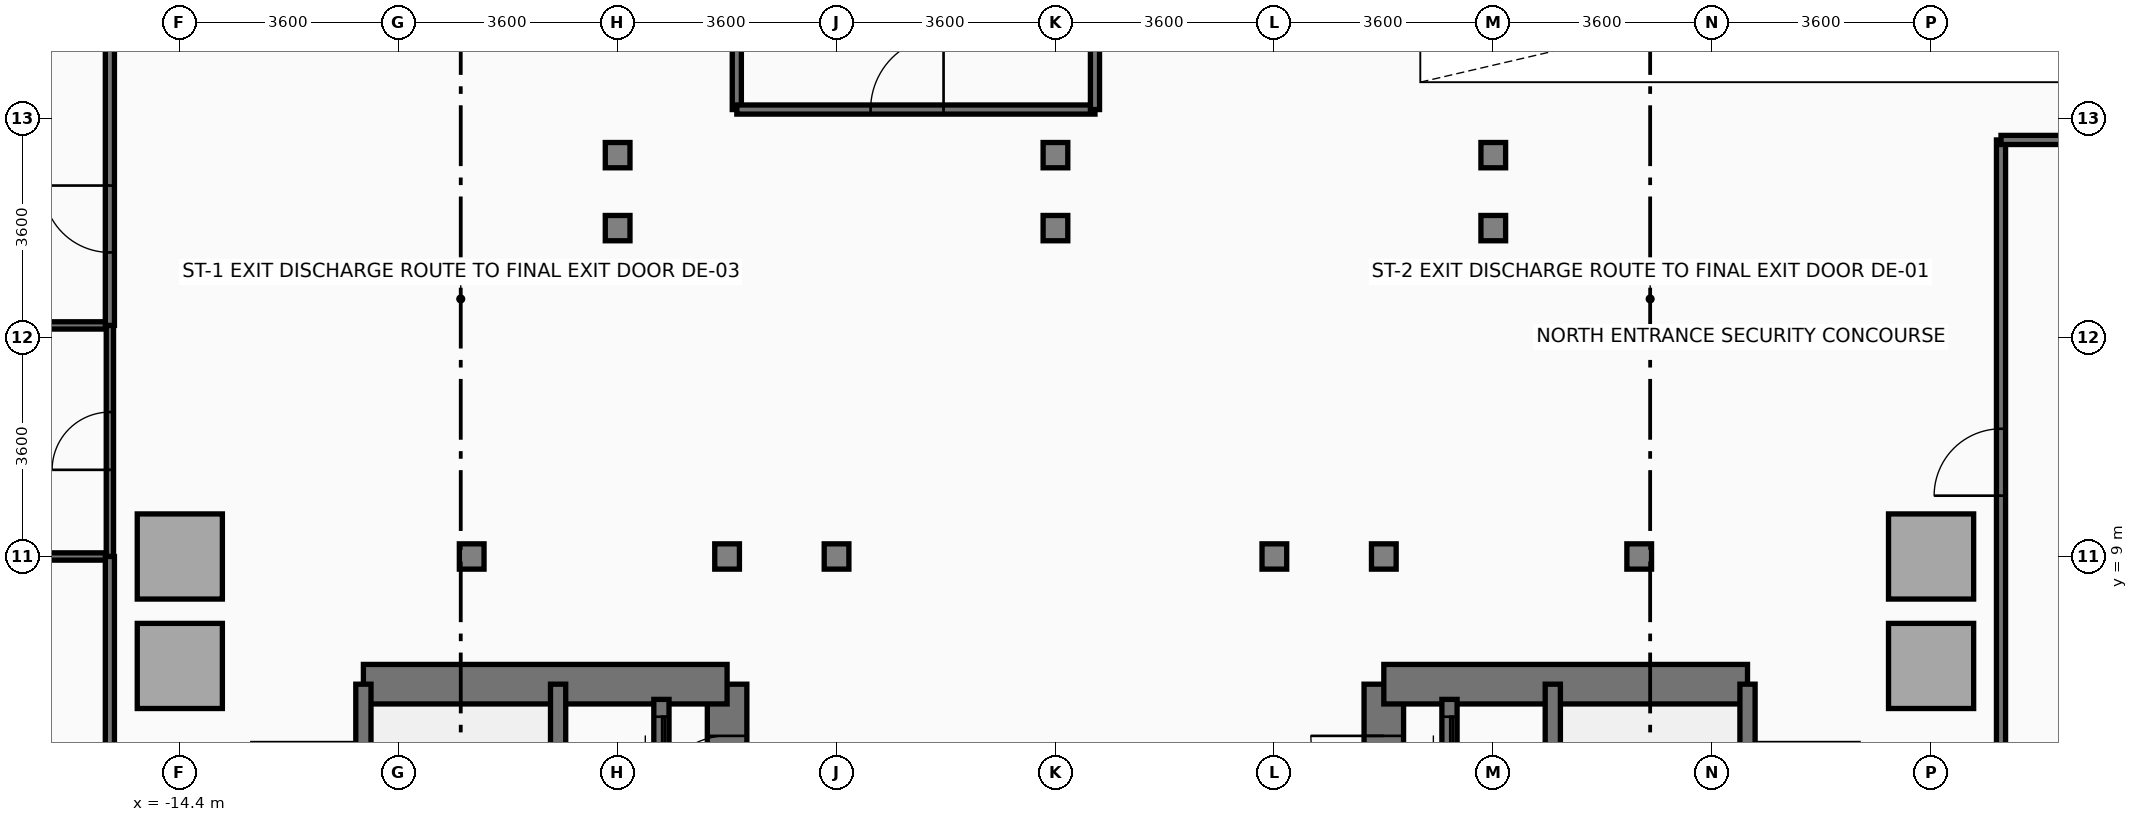
"""IFC4 building model, lengths in metres.
Left out: names, types, materials, properties, quantities, classifications, styles, units other than length and angle.
Written with IfcOpenShell. Run it as: python <this file> out.ifc"""

import sys

from ifc_helpers import new_model, si_unit, direction, frame, frame_2d, origin, origin_2d, place, context, subcontext, project, spatial, rectangle, i_section, extrude, source, transform, mapped, element, fill, save


model = new_model("IFC4")
c1 = context("Model", 3, precision=1e-05, world=origin(), true_north=direction((0.0, 1.0)))
c2 = subcontext(c1, "Body", "Model", "MODEL_VIEW")
j1 = project(units=[si_unit("LENGTHUNIT", "METRE"), si_unit("PLANEANGLEUNIT", "RADIAN")], contexts=[c1])
p1 = place(None, origin())
s1 = spatial("IfcSite", under=j1, at=p1, CompositionType="ELEMENT")
p2 = place(p1, origin())
s2 = spatial("IfcBuilding", under=s1, at=p2, CompositionType="ELEMENT")
p3 = place(p2, origin())
s3 = spatial("IfcBuildingStorey", under=s2, at=p3, CompositionType="ELEMENT", Elevation=0.0)
m1 = source(origin(), c2, "Body", "SweptSolid", [
    extrude(rectangle(XDim=1.4, YDim=1.4, at=origin_2d()), origin(), (0.0, 0.0, 1.0), 5.15),
])
for number, where, z_axis, x_axis in (
    (1, (-14.4, 7.2, 0.0), (0.0, 0.0, 1.0), (1.0, 0.0, 0.0)),
    (2, (-14.4, 9.0, 0.0), (0.0, 0.0, 1.0), (1.0, 0.0, 0.0)),
):
    element("IfcColumn", number, at=place(p3, frame(where, z_axis=z_axis, x_axis=x_axis)), inside=s3, PredefinedType="COLUMN", context=c2, shape_type="MappedRepresentation", body=[
        mapped(m1, transform((0.0, 0.0, 0.0), x_axis=(1.0, 0.0, 0.0), y_axis=(0.0, 1.0, 0.0), z_axis=(0.0, 0.0, 1.0), scale=1.0)),
    ])
m2 = source(origin(), c2, "Body", "SweptSolid", [
    extrude(i_section(OverallWidth=0.406, OverallDepth=0.416, WebThickness=0.024, FlangeThickness=0.039, at=origin_2d()), origin(), (0.0, 0.0, 1.0), 5.15),
])
for number, where, z_axis, x_axis in (
    (3, (-9.6, 9.0, 0.0), (0.0, 0.0, 1.0), (1.0, 0.0, 0.0)),
    (4, (-7.2, 14.4, 0.0), (0.0, 0.0, 1.0), (1.0, 0.0, 0.0)),
    (5, (-7.2, 15.6, 0.0), (0.0, 0.0, 1.0), (1.0, 0.0, 0.0)),
    (6, (-5.4, 9.0, 0.0), (0.0, 0.0, 1.0), (1.0, 0.0, 0.0)),
    (7, (-3.6, 9.0, 0.0), (0.0, 0.0, 1.0), (1.0, 0.0, 0.0)),
    (8, (0.0, 14.4, 0.0), (0.0, 0.0, 1.0), (1.0, 0.0, 0.0)),
    (9, (0.0, 15.6, 0.0), (0.0, 0.0, 1.0), (1.0, 0.0, 0.0)),
    (10, (3.6, 9.0, 0.0), (0.0, 0.0, 1.0), (1.0, 0.0, 0.0)),
    (11, (5.4, 9.0, 0.0), (0.0, 0.0, 1.0), (1.0, 0.0, 0.0)),
    (12, (7.2, 14.4, 0.0), (0.0, 0.0, 1.0), (1.0, 0.0, 0.0)),
    (13, (7.2, 15.6, 0.0), (0.0, 0.0, 1.0), (1.0, 0.0, 0.0)),
    (14, (9.6, 9.0, 0.0), (0.0, 0.0, 1.0), (1.0, 0.0, 0.0)),
):
    element("IfcColumn", number, at=place(p3, frame(where, z_axis=z_axis, x_axis=x_axis)), inside=s3, PredefinedType="COLUMN", context=c2, shape_type="MappedRepresentation", body=[
        mapped(m2, transform((0.0, 0.0, 0.0), x_axis=(1.0, 0.0, 0.0), y_axis=(0.0, 1.0, 0.0), z_axis=(0.0, 0.0, 1.0), scale=1.0)),
    ])
for number, where, z_axis, x_axis in (
    (15, (14.4, 7.2, 0.0), (0.0, 0.0, 1.0), (1.0, 0.0, 0.0)),
    (16, (14.4, 9.0, 0.0), (0.0, 0.0, 1.0), (1.0, 0.0, 0.0)),
):
    element("IfcColumn", number, at=place(p3, frame(where, z_axis=z_axis, x_axis=x_axis)), inside=s3, PredefinedType="COLUMN", context=c2, shape_type="MappedRepresentation", body=[
        mapped(m1, transform((0.0, 0.0, 0.0), x_axis=(1.0, 0.0, 0.0), y_axis=(0.0, 1.0, 0.0), z_axis=(0.0, 0.0, 1.0), scale=1.0)),
    ])
p4 = place(p3, frame((-5.4, -5.6, 0.0), z_axis=(0.0, 0.0, 1.0), x_axis=(0.0, 1.0, 0.0)))
e17 = element("IfcWall", 17, at=p4, inside=s3, PredefinedType="SHEAR", context=c2, shape_type="SweptSolid", body=[
    extrude(rectangle(XDim=12.5, YDim=0.65, at=frame_2d((6.25, 0.0))), origin(), (0.0, 0.0, 1.0), 5.15),
])
p5 = place(p4, frame((4.55, 0.0, 0.0)))
e18 = element("IfcOpeningElement", 18, at=p5, cuts=e17, PredefinedType="OPENING", context=c2, shape_type="SweptSolid", body=[
    extrude(rectangle(XDim=1.2, YDim=2.2, at=frame_2d((0.6, 1.1))), frame((0.0, 0.335, 0.0), z_axis=(0.0, -1.0, 0.0), x_axis=(1.0, 0.0, 0.0)), (0.0, 0.0, 1.0), 0.67),
])
p6 = place(p4, frame((10.45, 0.0, 0.0)))
e19 = element("IfcOpeningElement", 19, at=p6, cuts=e17, PredefinedType="OPENING", context=c2, shape_type="SweptSolid", body=[
    extrude(rectangle(XDim=1.2, YDim=2.2, at=frame_2d((0.6, 1.1))), frame((0.0, 0.335, 0.0), z_axis=(0.0, -1.0, 0.0), x_axis=(1.0, 0.0, 0.0)), (0.0, 0.0, 1.0), 0.67),
])
p7 = place(p4, frame((6.86, 0.0, 0.0)))
e20 = element("IfcOpeningElement", 20, at=p7, cuts=e17, PredefinedType="OPENING", context=c2, shape_type="SweptSolid", body=[
    extrude(rectangle(XDim=0.8, YDim=2.1, at=frame_2d((0.4, 1.05))), frame((0.0, 0.335, 0.0), z_axis=(0.0, -1.0, 0.0), x_axis=(1.0, 0.0, 0.0)), (0.0, 0.0, 1.0), 0.67),
])
p8 = place(p3, frame((-11.381, 6.9, 0.0), z_axis=(0.0, 0.0, 1.0), x_axis=(1.0, 0.0, 0.0)))
e21 = element("IfcWall", 21, at=p8, inside=s3, PredefinedType="SHEAR", context=c2, shape_type="SweptSolid", body=[
    extrude(rectangle(XDim=5.981, YDim=0.65, at=frame_2d((2.991, 0.0))), origin(), (0.0, 0.0, 1.0), 5.15),
])
p9 = place(p3, frame((-8.179, -0.041, 0.0), z_axis=(0.0, 0.0, 1.0), x_axis=(0.0, 1.0, 0.0)))
e22 = element("IfcWall", 22, at=p9, inside=s3, PredefinedType="SOLIDWALL", context=c2, shape_type="SweptSolid", body=[
    extrude(rectangle(XDim=6.941, YDim=0.25, at=frame_2d((3.47, 0.0))), origin(), (0.0, 0.0, 1.0), 5.15),
])
p10 = place(p9, frame((0.2, 0.0, 0.0)))
e23 = element("IfcOpeningElement", 23, at=p10, cuts=e22, PredefinedType="OPENING", context=c2, shape_type="SweptSolid", body=[
    extrude(rectangle(XDim=1.2, YDim=2.2, at=frame_2d((0.6, 1.1))), frame((0.0, 0.135, 0.0), z_axis=(0.0, -1.0, 0.0), x_axis=(1.0, 0.0, 0.0)), (0.0, 0.0, 1.0), 0.27),
])
p11 = place(p3, frame((-11.381, -0.041, 0.0), z_axis=(0.0, 0.0, 1.0), x_axis=(0.0, 1.0, 0.0)))
e24 = element("IfcWall", 24, at=p11, inside=s3, PredefinedType="SOLIDWALL", context=c2, shape_type="SweptSolid", body=[
    extrude(rectangle(XDim=6.941, YDim=0.25, at=frame_2d((3.47, 0.0))), origin(), (0.0, 0.0, 1.0), 5.15),
])
p12 = place(p3, frame((5.4, -5.6, 0.0), z_axis=(0.0, 0.0, 1.0), x_axis=(0.0, 1.0, 0.0)))
e25 = element("IfcWall", 25, at=p12, inside=s3, PredefinedType="SHEAR", context=c2, shape_type="SweptSolid", body=[
    extrude(rectangle(XDim=12.5, YDim=0.65, at=frame_2d((6.25, 0.0))), origin(), (0.0, 0.0, 1.0), 5.15),
])
p13 = place(p12, frame((4.55, 0.0, 0.0)))
e26 = element("IfcOpeningElement", 26, at=p13, cuts=e25, PredefinedType="OPENING", context=c2, shape_type="SweptSolid", body=[
    extrude(rectangle(XDim=1.2, YDim=2.2, at=frame_2d((0.6, 1.1))), frame((0.0, 0.335, 0.0), z_axis=(0.0, -1.0, 0.0), x_axis=(1.0, 0.0, 0.0)), (0.0, 0.0, 1.0), 0.67),
])
p14 = place(p12, frame((10.45, 0.0, 0.0)))
e27 = element("IfcOpeningElement", 27, at=p14, cuts=e25, PredefinedType="OPENING", context=c2, shape_type="SweptSolid", body=[
    extrude(rectangle(XDim=1.2, YDim=2.2, at=frame_2d((0.6, 1.1))), frame((0.0, 0.335, 0.0), z_axis=(0.0, -1.0, 0.0), x_axis=(1.0, 0.0, 0.0)), (0.0, 0.0, 1.0), 0.67),
])
p15 = place(p12, frame((6.86, 0.0, 0.0)))
e28 = element("IfcOpeningElement", 28, at=p15, cuts=e25, PredefinedType="OPENING", context=c2, shape_type="SweptSolid", body=[
    extrude(rectangle(XDim=0.8, YDim=2.1, at=frame_2d((0.4, 1.05))), frame((0.0, 0.335, 0.0), z_axis=(0.0, -1.0, 0.0), x_axis=(1.0, 0.0, 0.0)), (0.0, 0.0, 1.0), 0.67),
])
p16 = place(p12, frame((7.88, 0.0, 0.0)))
e29 = element("IfcOpeningElement", 29, at=p16, cuts=e25, PredefinedType="OPENING", context=c2, shape_type="SweptSolid", body=[
    extrude(rectangle(XDim=0.8, YDim=2.1, at=frame_2d((0.4, 1.05))), frame((0.0, 0.335, 0.0), z_axis=(0.0, -1.0, 0.0), x_axis=(1.0, 0.0, 0.0)), (0.0, 0.0, 1.0), 0.67),
])
p17 = place(p3, frame((5.4, 6.9, 0.0), z_axis=(0.0, 0.0, 1.0), x_axis=(1.0, 0.0, 0.0)))
e30 = element("IfcWall", 30, at=p17, inside=s3, PredefinedType="SHEAR", context=c2, shape_type="SweptSolid", body=[
    extrude(rectangle(XDim=5.981, YDim=0.65, at=frame_2d((2.991, 0.0))), origin(), (0.0, 0.0, 1.0), 5.15),
])
p18 = place(p3, frame((8.179, -0.041, 0.0), z_axis=(0.0, 0.0, 1.0), x_axis=(0.0, 1.0, 0.0)))
e31 = element("IfcWall", 31, at=p18, inside=s3, PredefinedType="SOLIDWALL", context=c2, shape_type="SweptSolid", body=[
    extrude(rectangle(XDim=6.941, YDim=0.25, at=frame_2d((3.47, 0.0))), origin(), (0.0, 0.0, 1.0), 5.15),
])
p19 = place(p18, frame((0.2, 0.0, 0.0)))
e32 = element("IfcOpeningElement", 32, at=p19, cuts=e31, PredefinedType="OPENING", context=c2, shape_type="SweptSolid", body=[
    extrude(rectangle(XDim=1.2, YDim=2.2, at=frame_2d((0.6, 1.1))), frame((0.0, 0.135, 0.0), z_axis=(0.0, -1.0, 0.0), x_axis=(1.0, 0.0, 0.0)), (0.0, 0.0, 1.0), 0.27),
])
p20 = place(p3, frame((11.381, -0.041, 0.0), z_axis=(0.0, 0.0, 1.0), x_axis=(0.0, 1.0, 0.0)))
e33 = element("IfcWall", 33, at=p20, inside=s3, PredefinedType="SOLIDWALL", context=c2, shape_type="SweptSolid", body=[
    extrude(rectangle(XDim=6.941, YDim=0.25, at=frame_2d((3.47, 0.0))), origin(), (0.0, 0.0, 1.0), 5.15),
])
p21 = place(p3, frame((-6.48, 4.98, 0.0), z_axis=(0.0, 0.0, 1.0), x_axis=(0.0, 1.0, 0.0)))
e34 = element("IfcWall", 34, at=p21, inside=s3, PredefinedType="SOLIDWALL", context=c2, shape_type="SweptSolid", body=[
    extrude(rectangle(XDim=1.67, YDim=0.25, at=frame_2d((0.835, 0.0))), origin(), (0.0, 0.0, 1.0), 5.15),
])
p22 = place(p21, frame((0.285, 0.0, 0.0)))
e35 = element("IfcOpeningElement", 35, at=p22, cuts=e34, PredefinedType="OPENING", context=c2, shape_type="SweptSolid", body=[
    extrude(rectangle(XDim=1.1, YDim=2.2, at=frame_2d((0.55, 1.1))), frame((0.0, 0.135, 0.0), z_axis=(0.0, -1.0, 0.0), x_axis=(1.0, 0.0, 0.0)), (0.0, 0.0, 1.0), 0.27),
])
p23 = place(p3, frame((6.48, 4.98, 0.0), z_axis=(0.0, 0.0, 1.0), x_axis=(0.0, 1.0, 0.0)))
e36 = element("IfcWall", 36, at=p23, inside=s3, PredefinedType="SOLIDWALL", context=c2, shape_type="SweptSolid", body=[
    extrude(rectangle(XDim=1.67, YDim=0.25, at=frame_2d((0.835, 0.0))), origin(), (0.0, 0.0, 1.0), 5.15),
])
p24 = place(p23, frame((0.285, 0.0, 0.0)))
e37 = element("IfcOpeningElement", 37, at=p24, cuts=e36, PredefinedType="OPENING", context=c2, shape_type="SweptSolid", body=[
    extrude(rectangle(XDim=1.1, YDim=2.2, at=frame_2d((0.55, 1.1))), frame((0.0, 0.135, 0.0), z_axis=(0.0, -1.0, 0.0), x_axis=(1.0, 0.0, 0.0)), (0.0, 0.0, 1.0), 0.27),
])
for number, where, z_axis, x_axis in (
    (38, (-19.2, 9.0, 0.0), (0.0, 0.0, 1.0), (1.0, 0.0, 0.0)),
    (39, (-19.2, 12.8, 0.0), (0.0, 0.0, 1.0), (1.0, 0.0, 0.0)),
):
    element("IfcWall", number, at=place(p3, frame(where, z_axis=z_axis, x_axis=x_axis)), inside=s3, PredefinedType="PARTITIONING", context=c2, shape_type="SweptSolid", body=[
        extrude(rectangle(XDim=3.65, YDim=0.12, at=frame_2d((1.825, 0.0))), origin(), (0.0, 0.0, 1.0), 5.15),
    ])
p25 = place(p3, frame((-15.55, 9.0, 0.0), z_axis=(0.0, 0.0, 1.0), x_axis=(0.0, 1.0, 0.0)))
e40 = element("IfcWall", 40, at=p25, inside=s3, PredefinedType="PARTITIONING", context=c2, shape_type="SweptSolid", body=[
    extrude(rectangle(XDim=3.8, YDim=0.12, at=frame_2d((1.9, 0.0))), origin(), (0.0, 0.0, 1.0), 5.15),
])
p26 = place(p25, frame((1.425, 0.0, 0.0)))
e41 = element("IfcOpeningElement", 41, at=p26, cuts=e40, PredefinedType="OPENING", context=c2, shape_type="SweptSolid", body=[
    extrude(rectangle(XDim=0.95, YDim=2.15, at=frame_2d((0.475, 1.075))), frame((0.0, 0.07, 0.0), z_axis=(0.0, -1.0, 0.0), x_axis=(1.0, 0.0, 0.0)), (0.0, 0.0, 1.0), 0.14),
])
p27 = place(p3, frame((-5.24, 16.35, 0.0), z_axis=(0.0, 0.0, 1.0), x_axis=(0.0, 1.0, 0.0)))
e42 = element("IfcWall", 42, at=p27, inside=s3, PredefinedType="PARTITIONING", context=c2, shape_type="SweptSolid", body=[
    extrude(rectangle(XDim=6.7, YDim=0.15, at=frame_2d((3.35, 0.0))), origin(), (0.0, 0.0, 1.0), 5.15),
])
p28 = place(p3, frame((-5.24, 16.35, 0.0), z_axis=(0.0, 0.0, 1.0), x_axis=(1.0, 0.0, 0.0)))
e43 = element("IfcWall", 43, at=p28, inside=s3, PredefinedType="PARTITIONING", context=c2, shape_type="SweptSolid", body=[
    extrude(rectangle(XDim=5.89, YDim=0.15, at=frame_2d((2.945, 0.0))), origin(), (0.0, 0.0, 1.0), 4.55),
])
p29 = place(p28, frame((2.2, 0.0, 0.0)))
e44 = element("IfcOpeningElement", 44, at=p29, cuts=e43, PredefinedType="OPENING", context=c2, shape_type="SweptSolid", body=[
    extrude(rectangle(XDim=1.2, YDim=2.2, at=frame_2d((0.6, 1.1))), frame((0.0, 0.085, 0.0), z_axis=(0.0, -1.0, 0.0), x_axis=(1.0, 0.0, 0.0)), (0.0, 0.0, 1.0), 0.17),
])
p30 = place(p3, frame((0.65, 16.35, 0.0), z_axis=(0.0, 0.0, 1.0), x_axis=(0.0, 1.0, 0.0)))
e45 = element("IfcWall", 45, at=p30, inside=s3, PredefinedType="PARTITIONING", context=c2, shape_type="SweptSolid", body=[
    extrude(rectangle(XDim=6.49, YDim=0.15, at=frame_2d((3.245, 0.0))), origin(), (0.0, 0.0, 1.0), 3.8),
])
p31 = place(p3, frame((-15.55, -6.85, 0.0), z_axis=(0.0, 0.0, 1.0), x_axis=(0.0, 1.0, 0.0)))
e46 = element("IfcWall", 46, at=p31, inside=s3, PredefinedType="PARTITIONING", context=c2, shape_type="SweptSolid", body=[
    extrude(rectangle(XDim=15.85, YDim=0.15, at=frame_2d((7.925, 0.0))), origin(), (0.0, 0.0, 1.0), 3.8),
])
p32 = place(p3, frame((-15.55, 12.8, 0.0), z_axis=(0.0, 0.0, 1.0), x_axis=(0.0, 1.0, 0.0)))
e47 = element("IfcWall", 47, at=p32, inside=s3, PredefinedType="PARTITIONING", context=c2, shape_type="SweptSolid", body=[
    extrude(rectangle(XDim=10.25, YDim=0.15, at=frame_2d((5.125, 0.0))), origin(), (0.0, 0.0, 1.0), 5.15),
])
p33 = place(p32, frame((1.2, 0.0, 0.0)))
e48 = element("IfcOpeningElement", 48, at=p33, cuts=e47, PredefinedType="OPENING", context=c2, shape_type="SweptSolid", body=[
    extrude(rectangle(XDim=1.1, YDim=2.2, at=frame_2d((0.55, 1.1))), frame((0.0, 0.085, 0.0), z_axis=(0.0, -1.0, 0.0), x_axis=(1.0, 0.0, 0.0)), (0.0, 0.0, 1.0), 0.17),
])
p34 = place(p3, frame((15.55, -6.85, 0.0), z_axis=(0.0, 0.0, 1.0), x_axis=(0.0, 1.0, 0.0)))
e49 = element("IfcWall", 49, at=p34, inside=s3, PredefinedType="PARTITIONING", context=c2, shape_type="SweptSolid", body=[
    extrude(rectangle(XDim=22.7, YDim=0.15, at=frame_2d((11.35, 0.0))), origin(), (0.0, 0.0, 1.0), 3.8),
])
p35 = place(p34, frame((16.85, 0.0, 0.0)))
e50 = element("IfcOpeningElement", 50, at=p35, cuts=e49, PredefinedType="OPENING", context=c2, shape_type="SweptSolid", body=[
    extrude(rectangle(XDim=1.1, YDim=2.2, at=frame_2d((0.55, 1.1))), frame((0.0, 0.085, 0.0), z_axis=(0.0, -1.0, 0.0), x_axis=(1.0, 0.0, 0.0)), (0.0, 0.0, 1.0), 0.17),
])
p36 = place(p3, frame((15.55, 15.85, 0.0), z_axis=(0.0, 0.0, 1.0), x_axis=(1.0, 0.0, 0.0)))
e51 = element("IfcWall", 51, at=p36, inside=s3, PredefinedType="PARTITIONING", context=c2, shape_type="SweptSolid", body=[
    extrude(rectangle(XDim=16.5, YDim=0.15, at=frame_2d((8.25, 0.0))), origin(), (0.0, 0.0, 1.0), 5.15),
])
m3 = source(origin(), c2, "Body", "SweptSolid", [
    extrude(rectangle(XDim=1.2, YDim=2.2, at=frame_2d((0.6, 1.1))), frame((0.0, 0.025, 0.0), z_axis=(0.0, -1.0, 0.0), x_axis=(1.0, 0.0, 0.0)), (0.0, 0.0, 1.0), 0.05),
])
p37 = place(p6, origin())
e52 = element("IfcDoor", 52, at=p37, inside=s3, OperationType="SINGLE_SWING_LEFT", PredefinedType="DOOR", context=c2, shape_type="MappedRepresentation", body=[
    mapped(m3, transform((0.0, 0.0, 0.0), x_axis=(1.0, 0.0, 0.0), y_axis=(0.0, 1.0, 0.0), z_axis=(0.0, 0.0, 1.0), scale=1.0)),
])
fill(e19, e52)
p38 = place(p14, origin())
e53 = element("IfcDoor", 53, at=p38, inside=s3, OperationType="SINGLE_SWING_RIGHT", PredefinedType="DOOR", context=c2, shape_type="MappedRepresentation", body=[
    mapped(m3, transform((0.0, 0.0, 0.0), x_axis=(1.0, 0.0, 0.0), y_axis=(0.0, 1.0, 0.0), z_axis=(0.0, 0.0, 1.0), scale=1.0)),
])
fill(e27, e53)
m4 = source(origin(), c2, "Body", "SweptSolid", [
    extrude(rectangle(XDim=1.1, YDim=2.2, at=frame_2d((0.55, 1.1))), frame((0.0, 0.025, 0.0), z_axis=(0.0, -1.0, 0.0), x_axis=(1.0, 0.0, 0.0)), (0.0, 0.0, 1.0), 0.05),
])
p39 = place(p22, origin())
e54 = element("IfcDoor", 54, at=p39, inside=s3, OperationType="SLIDING_TO_LEFT", PredefinedType="DOOR", context=c2, shape_type="MappedRepresentation", body=[
    mapped(m4, transform((0.0, 0.0, 0.0), x_axis=(1.0, 0.0, 0.0), y_axis=(0.0, 1.0, 0.0), z_axis=(0.0, 0.0, 1.0), scale=1.0)),
])
fill(e35, e54)
p40 = place(p24, origin())
e55 = element("IfcDoor", 55, at=p40, inside=s3, OperationType="SLIDING_TO_LEFT", PredefinedType="DOOR", context=c2, shape_type="MappedRepresentation", body=[
    mapped(m4, transform((0.0, 0.0, 0.0), x_axis=(1.0, 0.0, 0.0), y_axis=(0.0, 1.0, 0.0), z_axis=(0.0, 0.0, 1.0), scale=1.0)),
])
fill(e37, e55)
m5 = source(origin(), c2, "Body", "SweptSolid", [
    extrude(rectangle(XDim=0.95, YDim=2.15, at=frame_2d((0.475, 1.075))), frame((0.0, 0.025, 0.0), z_axis=(0.0, -1.0, 0.0), x_axis=(1.0, 0.0, 0.0)), (0.0, 0.0, 1.0), 0.05),
])
p41 = place(p26, origin())
e56 = element("IfcDoor", 56, at=p41, inside=s3, OperationType="SINGLE_SWING_LEFT", PredefinedType="DOOR", context=c2, shape_type="MappedRepresentation", body=[
    mapped(m5, transform((0.0, 0.0, 0.0), x_axis=(1.0, 0.0, 0.0), y_axis=(0.0, 1.0, 0.0), z_axis=(0.0, 0.0, 1.0), scale=1.0)),
])
fill(e41, e56)
p42 = place(p29, origin())
e57 = element("IfcDoor", 57, at=p42, inside=s3, OperationType="SINGLE_SWING_RIGHT", PredefinedType="DOOR", context=c2, shape_type="MappedRepresentation", body=[
    mapped(m3, transform((0.0, 0.0, 0.0), x_axis=(1.0, 0.0, 0.0), y_axis=(0.0, 1.0, 0.0), z_axis=(0.0, 0.0, 1.0), scale=1.0)),
])
fill(e44, e57)
p43 = place(p33, origin())
e58 = element("IfcDoor", 58, at=p43, inside=s3, OperationType="SINGLE_SWING_RIGHT", PredefinedType="DOOR", context=c2, shape_type="MappedRepresentation", body=[
    mapped(m4, transform((0.0, 0.0, 0.0), x_axis=(1.0, 0.0, 0.0), y_axis=(0.0, 1.0, 0.0), z_axis=(0.0, 0.0, 1.0), scale=1.0)),
])
fill(e48, e58)
p44 = place(p35, origin())
e59 = element("IfcDoor", 59, at=p44, inside=s3, OperationType="SINGLE_SWING_LEFT", PredefinedType="DOOR", context=c2, shape_type="MappedRepresentation", body=[
    mapped(m4, transform((0.0, 0.0, 0.0), x_axis=(1.0, 0.0, 0.0), y_axis=(0.0, 1.0, 0.0), z_axis=(0.0, 0.0, 1.0), scale=1.0)),
])
fill(e50, e59)
save(model, sys.argv[1])
